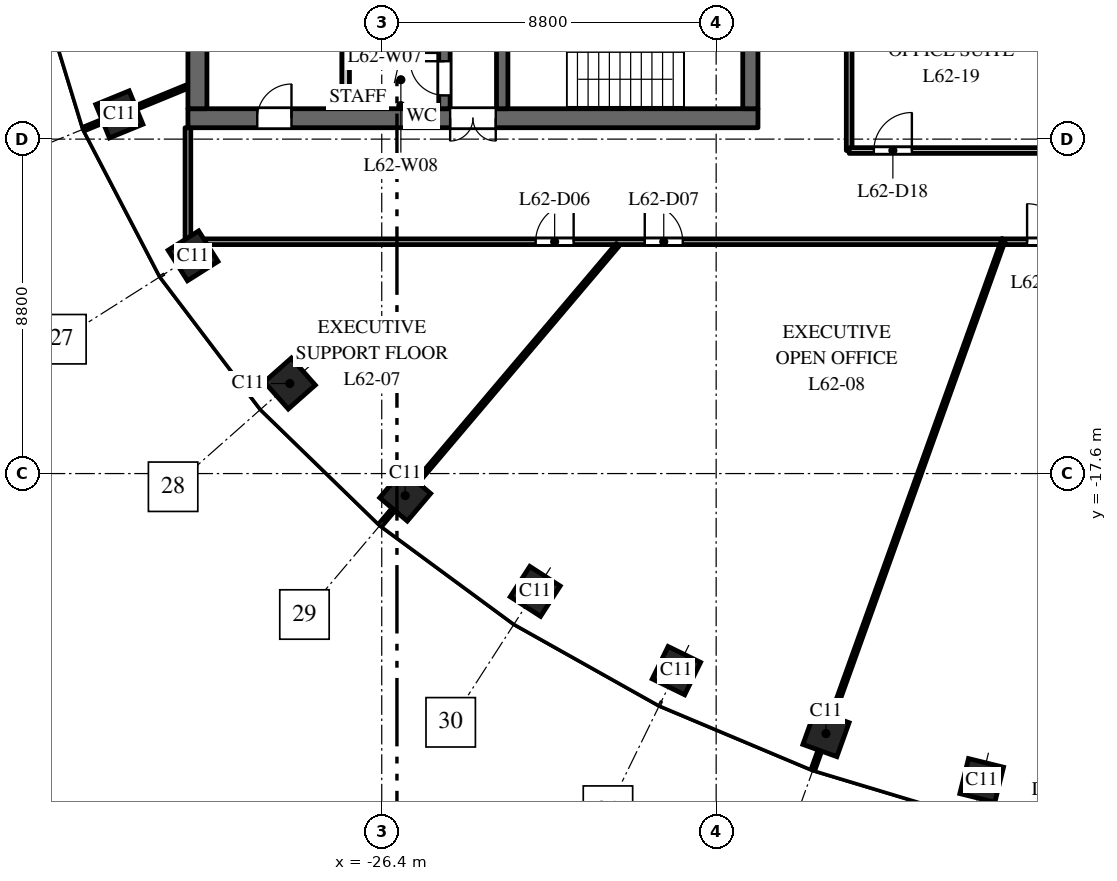
"""IFC4 building model, lengths in metres.
Left out: names, types, materials, properties, quantities, classifications, styles, units other than length and angle.
Written with IfcOpenShell. Run it as: python <this file> out.ifc"""

import sys

from ifc_helpers import new_model, si_unit, direction, frame, frame_2d, origin, origin_2d, place, context, subcontext, project, spatial, rectangle, extrude, element, fill, save


model = new_model("IFC4")
c1 = context("Model", 3, precision=1e-05, world=origin(), true_north=direction((0.0, 1.0)))
c2 = subcontext(c1, "Body", "Model", "MODEL_VIEW")
j1 = project(units=[si_unit("LENGTHUNIT", "METRE"), si_unit("PLANEANGLEUNIT", "RADIAN")], contexts=[c1])
p1 = place(None, origin())
s1 = spatial("IfcSite", under=j1, at=p1, CompositionType="ELEMENT")
p2 = place(p1, origin())
s2 = spatial("IfcBuilding", under=s1, at=p2, CompositionType="ELEMENT")
p3 = place(p2, frame((0.0, 0.0, 291.0)))
s3 = spatial("IfcBuildingStorey", under=s2, at=p3, CompositionType="ELEMENT", Elevation=291.0)
for number, where, z_axis, x_axis in (
    (1, (-33.305, -8.149, 0.0), (0.0, 0.0, 1.0), (0.379, -0.925, 0.0)),
    (2, (-31.365, -11.871, 0.0), (0.0, 0.0, 1.0), (0.535, -0.845, 0.0)),
    (3, (-28.819, -15.23, 0.0), (0.0, 0.0, 1.0), (0.663, -0.749, 0.0)),
    (4, (-25.783, -18.18, 0.0), (0.0, 0.0, 1.0), (0.763, -0.646, 0.0)),
    (5, (-22.362, -20.7, 0.0), (0.0, 0.0, 1.0), (0.84, -0.542, 0.0)),
    (6, (-18.646, -22.785, 0.0), (0.0, 0.0, 1.0), (0.898, -0.439, 0.0)),
    (7, (-14.709, -24.441, 0.0), (0.0, 0.0, 1.0), (0.941, -0.338, 0.0)),
    (8, (-10.613, -25.674, 0.0), (0.0, 0.0, 1.0), (0.971, -0.24, 0.0)),
):
    element("IfcColumn", number, at=place(p3, frame(where, z_axis=z_axis, x_axis=x_axis)), inside=s3, PredefinedType="COLUMN", context=c2, shape_type="SweptSolid", body=[
        extrude(rectangle(XDim=0.95, YDim=0.95, at=origin_2d()), origin(), (0.0, 0.0, 1.0), 4.0),
    ])
p4 = place(p3, frame((-16.5, -8.25, 0.0), z_axis=(0.0, 0.0, 1.0), x_axis=(-1.0, 0.0, 0.0)))
e9 = element("IfcWall", 9, at=p4, inside=s3, PredefinedType="SHEAR", context=c2, shape_type="SweptSolid", body=[
    extrude(rectangle(XDim=15.0, YDim=0.5, at=frame_2d((7.5, 0.0))), origin(), (0.0, 0.0, 1.0), 3.7),
])
p5 = place(p4, frame((6.9, 0.0, 0.0)))
e10 = element("IfcOpeningElement", 10, at=p5, cuts=e9, PredefinedType="OPENING", context=c2, shape_type="SweptSolid", body=[
    extrude(rectangle(XDim=1.2, YDim=2.1, at=frame_2d((0.6, 1.05))), frame((0.0, 0.26, 0.0), z_axis=(0.0, -1.0, 0.0), x_axis=(1.0, 0.0, 0.0)), (0.0, 0.0, 1.0), 0.52),
])
p6 = place(p4, frame((12.275, 0.0, 0.0)))
e11 = element("IfcOpeningElement", 11, at=p6, cuts=e9, PredefinedType="OPENING", context=c2, shape_type="SweptSolid", body=[
    extrude(rectangle(XDim=0.9, YDim=2.1, at=frame_2d((0.45, 1.05))), frame((0.0, 0.26, 0.0), z_axis=(0.0, -1.0, 0.0), x_axis=(1.0, 0.0, 0.0)), (0.0, 0.0, 1.0), 0.52),
])
p7 = place(p3, frame((-24.75, -8.0, 0.0), z_axis=(0.0, 0.0, 1.0), x_axis=(0.0, 1.0, 0.0)))
e12 = element("IfcWall", 12, at=p7, inside=s3, PredefinedType="SHEAR", context=c2, shape_type="SweptSolid", body=[
    extrude(rectangle(XDim=16.0, YDim=0.3, at=frame_2d((8.0, 0.0))), origin(), (0.0, 0.0, 1.0), 3.7),
])
p8 = place(p7, frame((4.425, 0.0, 0.0)))
e13 = element("IfcOpeningElement", 13, at=p8, cuts=e12, PredefinedType="OPENING", context=c2, shape_type="SweptSolid", body=[
    extrude(rectangle(XDim=1.1, YDim=2.1, at=frame_2d((0.55, 1.05))), frame((0.0, 0.16, 0.0), z_axis=(0.0, -1.0, 0.0), x_axis=(1.0, 0.0, 0.0)), (0.0, 0.0, 1.0), 0.32),
])
p9 = place(p7, frame((7.45, 0.0, 0.0)))
e14 = element("IfcOpeningElement", 14, at=p9, cuts=e12, PredefinedType="OPENING", context=c2, shape_type="SweptSolid", body=[
    extrude(rectangle(XDim=1.1, YDim=2.1, at=frame_2d((0.55, 1.05))), frame((0.0, 0.16, 0.0), z_axis=(0.0, -1.0, 0.0), x_axis=(1.0, 0.0, 0.0)), (0.0, 0.0, 1.0), 0.32),
])
p10 = place(p7, frame((10.575, 0.0, 0.0)))
e15 = element("IfcOpeningElement", 15, at=p10, cuts=e12, PredefinedType="OPENING", context=c2, shape_type="SweptSolid", body=[
    extrude(rectangle(XDim=0.9, YDim=2.1, at=frame_2d((0.45, 1.05))), frame((0.0, 0.16, 0.0), z_axis=(0.0, -1.0, 0.0), x_axis=(1.0, 0.0, 0.0)), (0.0, 0.0, 1.0), 0.32),
])
p11 = place(p7, frame((13.75, 0.0, 0.0)))
e16 = element("IfcOpeningElement", 16, at=p11, cuts=e12, PredefinedType="OPENING", context=c2, shape_type="SweptSolid", body=[
    extrude(rectangle(XDim=0.9, YDim=2.1, at=frame_2d((0.45, 1.05))), frame((0.0, 0.16, 0.0), z_axis=(0.0, -1.0, 0.0), x_axis=(1.0, 0.0, 0.0)), (0.0, 0.0, 1.0), 0.32),
])
p12 = place(p7, frame((1.975, 0.0, 0.0)))
e17 = element("IfcOpeningElement", 17, at=p12, cuts=e12, PredefinedType="OPENING", context=c2, shape_type="SweptSolid", body=[
    extrude(rectangle(XDim=0.9, YDim=2.1, at=frame_2d((0.45, 1.05))), frame((0.0, 0.16, 0.0), z_axis=(0.0, -1.0, 0.0), x_axis=(1.0, 0.0, 0.0)), (0.0, 0.0, 1.0), 0.32),
])
p13 = place(p7, frame((0.35, 0.0, 0.0)))
e18 = element("IfcOpeningElement", 18, at=p13, cuts=e12, PredefinedType="OPENING", context=c2, shape_type="SweptSolid", body=[
    extrude(rectangle(XDim=0.9, YDim=2.1, at=frame_2d((0.45, 1.05))), frame((0.0, 0.16, 0.0), z_axis=(0.0, -1.0, 0.0), x_axis=(1.0, 0.0, 0.0)), (0.0, 0.0, 1.0), 0.32),
])
p14 = place(p3, frame((-16.7, -8.0, 0.0), z_axis=(0.0, 0.0, 1.0), x_axis=(0.0, 1.0, 0.0)))
e19 = element("IfcWall", 19, at=p14, inside=s3, PredefinedType="SHEAR", context=c2, shape_type="SweptSolid", body=[
    extrude(rectangle(XDim=16.0, YDim=0.4, at=frame_2d((8.0, 0.0))), origin(), (0.0, 0.0, 1.0), 3.7),
])
p15 = place(p3, frame((-31.25, -8.0, 0.0), z_axis=(0.0, 0.0, 1.0), x_axis=(0.0, 1.0, 0.0)))
e20 = element("IfcWall", 20, at=p15, inside=s3, PredefinedType="SHEAR", context=c2, shape_type="SweptSolid", body=[
    extrude(rectangle(XDim=16.0, YDim=0.5, at=frame_2d((8.0, 0.0))), origin(), (0.0, 0.0, 1.0), 3.7),
])
p16 = place(p3, frame((-27.35, -8.0, 0.0), z_axis=(0.0, 0.0, 1.0), x_axis=(0.0, 1.0, 0.0)))
e21 = element("IfcWall", 21, at=p16, inside=s3, PredefinedType="PARTITIONING", context=c2, shape_type="SweptSolid", body=[
    extrude(rectangle(XDim=3.25, YDim=0.2, at=frame_2d((1.625, 0.0))), origin(), (0.0, 0.0, 1.0), 3.7),
])
p17 = place(p3, frame((-23.23, -8.0, 0.0), z_axis=(0.0, 0.0, 1.0), x_axis=(0.0, 1.0, 0.0)))
e22 = element("IfcWall", 22, at=p17, inside=s3, PredefinedType="SHEAR", context=c2, shape_type="SweptSolid", body=[
    extrude(rectangle(XDim=7.875, YDim=0.3, at=frame_2d((3.938, 0.0))), origin(), (0.0, 0.0, 1.0), 3.7),
])
p18 = place(p17, frame((5.15, 0.0, 0.0)))
e23 = element("IfcOpeningElement", 23, at=p18, cuts=e22, PredefinedType="OPENING", context=c2, shape_type="SweptSolid", body=[
    extrude(rectangle(XDim=1.1, YDim=2.1, at=frame_2d((0.55, 1.05))), frame((0.0, 0.16, 0.0), z_axis=(0.0, -1.0, 0.0), x_axis=(1.0, 0.0, 0.0)), (0.0, 0.0, 1.0), 0.32),
])
p19 = place(p3, frame((-34.234, -8.53, 0.0), z_axis=(0.0, 0.0, 1.0), x_axis=(0.925344112436, 0.379128307542, 0.0)))
e24 = element("IfcWall", 24, at=p19, inside=s3, PredefinedType="PARTITIONING", context=c2, shape_type="SweptSolid", body=[
    extrude(rectangle(XDim=2.954, YDim=0.1, at=frame_2d((1.477, 0.0))), origin(), (0.0, 0.0, 1.0), 3.0),
])
p20 = place(p3, frame((-31.5, -11.5, 0.0), z_axis=(0.0, 0.0, 1.0), x_axis=(0.0, 1.0, 0.0)))
e25 = element("IfcWall", 25, at=p20, inside=s3, PredefinedType="PARTITIONING", context=c2, shape_type="SweptSolid", body=[
    extrude(rectangle(XDim=3.0, YDim=0.15, at=frame_2d((1.5, 0.0))), origin(), (0.0, 0.0, 1.0), 3.0),
])
p21 = place(p3, frame((-31.5, -11.5, 0.0), z_axis=(0.0, 0.0, 1.0), x_axis=(1.0, 0.0, 0.0)))
e26 = element("IfcWall", 26, at=p21, inside=s3, PredefinedType="PARTITIONING", context=c2, shape_type="SweptSolid", body=[
    extrude(rectangle(XDim=21.432, YDim=0.15, at=frame_2d((10.716, 0.0))), origin(), (0.0, 0.0, 1.0), 2.75),
])
p22 = place(p21, frame((9.15, 0.0, 0.0)))
e27 = element("IfcOpeningElement", 27, at=p22, cuts=e26, PredefinedType="OPENING", context=c2, shape_type="SweptSolid", body=[
    extrude(rectangle(XDim=1.0, YDim=2.1, at=frame_2d((0.5, 1.05))), frame((0.0, 0.085, 0.0), z_axis=(0.0, -1.0, 0.0), x_axis=(1.0, 0.0, 0.0)), (0.0, 0.0, 1.0), 0.17),
])
p23 = place(p21, frame((12.021, 0.0, 0.0)))
e28 = element("IfcOpeningElement", 28, at=p23, cuts=e26, PredefinedType="OPENING", context=c2, shape_type="SweptSolid", body=[
    extrude(rectangle(XDim=1.0, YDim=2.1, at=frame_2d((0.5, 1.05))), frame((0.0, 0.085, 0.0), z_axis=(0.0, -1.0, 0.0), x_axis=(1.0, 0.0, 0.0)), (0.0, 0.0, 1.0), 0.17),
])
p24 = place(p3, frame((-26.43, -18.945, 0.0), z_axis=(0.0, 0.0, 1.0), x_axis=(0.646376264927, 0.763018822926, 0.0)))
e29 = element("IfcWall", 29, at=p24, inside=s3, PredefinedType="PARTITIONING", context=c2, shape_type="SweptSolid", body=[
    extrude(rectangle(XDim=9.655, YDim=0.1, at=frame_2d((4.828, 0.0))), origin(), (0.0, 0.0, 1.0), 2.75),
])
p25 = place(p3, frame((-15.049, -25.383, 0.0), z_axis=(0.0, 0.0, 1.0), x_axis=(0.338454781071, 0.94098265721, 0.0)))
e30 = element("IfcWall", 30, at=p25, inside=s3, PredefinedType="PARTITIONING", context=c2, shape_type="SweptSolid", body=[
    extrude(rectangle(XDim=14.829, YDim=0.1, at=frame_2d((7.415, 0.0))), origin(), (0.0, 0.0, 1.0), 2.75),
])
p26 = place(p3, frame((-14.1, -9.1, 0.0), z_axis=(0.0, 0.0, 1.0), x_axis=(0.0, 1.0, 0.0)))
e31 = element("IfcWall", 31, at=p26, inside=s3, PredefinedType="PARTITIONING", context=c2, shape_type="SweptSolid", body=[
    extrude(rectangle(XDim=5.005, YDim=0.15, at=frame_2d((2.502, 0.0))), origin(), (0.0, 0.0, 1.0), 3.7),
])
p27 = place(p3, frame((-14.1, -9.1, 0.0), z_axis=(0.0, 0.0, 1.0), x_axis=(1.0, 0.0, 0.0)))
e32 = element("IfcWall", 32, at=p27, inside=s3, PredefinedType="PARTITIONING", context=c2, shape_type="SweptSolid", body=[
    extrude(rectangle(XDim=12.3, YDim=0.15, at=frame_2d((6.15, 0.0))), origin(), (0.0, 0.0, 1.0), 2.75),
])
p28 = place(p27, frame((0.65, 0.0, 0.0)))
e33 = element("IfcOpeningElement", 33, at=p28, cuts=e32, PredefinedType="OPENING", context=c2, shape_type="SweptSolid", body=[
    extrude(rectangle(XDim=1.0, YDim=2.1, at=frame_2d((0.5, 1.05))), frame((0.0, 0.085, 0.0), z_axis=(0.0, -1.0, 0.0), x_axis=(1.0, 0.0, 0.0)), (0.0, 0.0, 1.0), 0.17),
])
p29 = place(p3, frame((-10.003, -11.5, 0.0), z_axis=(0.0, 0.0, 1.0), x_axis=(1.0, 0.0, 0.0)))
e34 = element("IfcWall", 34, at=p29, inside=s3, PredefinedType="PARTITIONING", context=c2, shape_type="SweptSolid", body=[
    extrude(rectangle(XDim=8.6, YDim=0.15, at=frame_2d((4.3, 0.0))), origin(), (0.0, 0.0, 1.0), 2.75),
])
p30 = place(p29, frame((0.585, 0.0, 0.0)))
e35 = element("IfcOpeningElement", 35, at=p30, cuts=e34, PredefinedType="OPENING", context=c2, shape_type="SweptSolid", body=[
    extrude(rectangle(XDim=1.0, YDim=2.1, at=frame_2d((0.5, 1.05))), frame((0.0, 0.085, 0.0), z_axis=(0.0, -1.0, 0.0), x_axis=(1.0, 0.0, 0.0)), (0.0, 0.0, 1.0), 0.17),
])
p31 = place(p5, origin())
e36 = element("IfcDoor", 36, at=p31, inside=s3, OperationType="DOUBLE_DOOR_DOUBLE_SWING", PredefinedType="DOOR", context=c2, shape_type="SweptSolid", body=[
    extrude(rectangle(XDim=1.2, YDim=2.1, at=frame_2d((0.6, 1.05))), frame((0.0, 0.025, 0.0), z_axis=(0.0, -1.0, 0.0), x_axis=(1.0, 0.0, 0.0)), (0.0, 0.0, 1.0), 0.05),
])
fill(e10, e36)
p32 = place(p13, origin())
e37 = element("IfcDoor", 37, at=p32, inside=s3, OperationType="SINGLE_SWING_LEFT", PredefinedType="DOOR", context=c2, shape_type="SweptSolid", body=[
    extrude(rectangle(XDim=0.9, YDim=2.1, at=frame_2d((0.45, 1.05))), frame((0.0, 0.025, 0.0), z_axis=(0.0, -1.0, 0.0), x_axis=(1.0, 0.0, 0.0)), (0.0, 0.0, 1.0), 0.05),
])
fill(e18, e37)
p33 = place(p6, origin())
e38 = element("IfcDoor", 38, at=p33, inside=s3, OperationType="SINGLE_SWING_LEFT", PredefinedType="DOOR", context=c2, shape_type="SweptSolid", body=[
    extrude(rectangle(XDim=0.9, YDim=2.1, at=frame_2d((0.45, 1.05))), frame((0.0, 0.025, 0.0), z_axis=(0.0, -1.0, 0.0), x_axis=(1.0, 0.0, 0.0)), (0.0, 0.0, 1.0), 0.05),
])
fill(e11, e38)
p34 = place(p22, origin())
e39 = element("IfcDoor", 39, at=p34, inside=s3, OperationType="SINGLE_SWING_RIGHT", PredefinedType="DOOR", context=c2, shape_type="SweptSolid", body=[
    extrude(rectangle(XDim=1.0, YDim=2.1, at=frame_2d((0.5, 1.05))), frame((0.0, 0.025, 0.0), z_axis=(0.0, -1.0, 0.0), x_axis=(1.0, 0.0, 0.0)), (0.0, 0.0, 1.0), 0.05),
])
fill(e27, e39)
p35 = place(p23, origin())
e40 = element("IfcDoor", 40, at=p35, inside=s3, OperationType="SINGLE_SWING_LEFT", PredefinedType="DOOR", context=c2, shape_type="SweptSolid", body=[
    extrude(rectangle(XDim=1.0, YDim=2.1, at=frame_2d((0.5, 1.05))), frame((0.0, 0.025, 0.0), z_axis=(0.0, -1.0, 0.0), x_axis=(1.0, 0.0, 0.0)), (0.0, 0.0, 1.0), 0.05),
])
fill(e28, e40)
p36 = place(p30, origin())
e41 = element("IfcDoor", 41, at=p36, inside=s3, OperationType="SINGLE_SWING_LEFT", PredefinedType="DOOR", context=c2, shape_type="SweptSolid", body=[
    extrude(rectangle(XDim=1.0, YDim=2.1, at=frame_2d((0.5, 1.05))), frame((0.0, 0.025, 0.0), z_axis=(0.0, -1.0, 0.0), x_axis=(1.0, 0.0, 0.0)), (0.0, 0.0, 1.0), 0.05),
])
fill(e35, e41)
p37 = place(p28, origin())
e42 = element("IfcDoor", 42, at=p37, inside=s3, OperationType="SINGLE_SWING_RIGHT", PredefinedType="DOOR", context=c2, shape_type="SweptSolid", body=[
    extrude(rectangle(XDim=1.0, YDim=2.1, at=frame_2d((0.5, 1.05))), frame((0.0, 0.025, 0.0), z_axis=(0.0, -1.0, 0.0), x_axis=(1.0, 0.0, 0.0)), (0.0, 0.0, 1.0), 0.05),
])
fill(e33, e42)
save(model, sys.argv[1])
